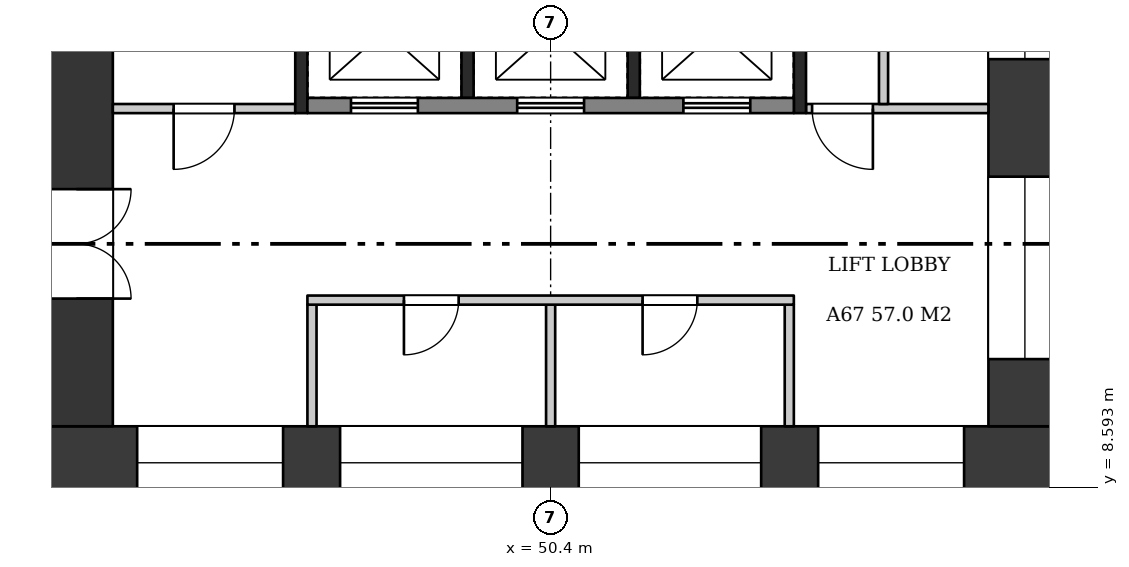
"""IFC4 building model, lengths in metres.
Left out: names, types, materials, properties, quantities, classifications, styles, units other than length and angle.
Written with IfcOpenShell. Run it as: python <this file> out.ifc"""

import sys

from ifc_helpers import new_model, si_unit, direction, frame, frame_2d, origin, place, context, subcontext, project, spatial, rectangle, extrude, element, fill, save


model = new_model("IFC4")
c1 = context("Model", 3, precision=1e-05, world=origin(), true_north=direction((0.0, 1.0)))
c2 = subcontext(c1, "Body", "Model", "MODEL_VIEW")
j1 = project(units=[si_unit("LENGTHUNIT", "METRE"), si_unit("PLANEANGLEUNIT", "RADIAN")], contexts=[c1])
p1 = place(None, origin())
s1 = spatial("IfcSite", under=j1, at=p1, CompositionType="ELEMENT")
p2 = place(p1, origin())
s2 = spatial("IfcBuilding", under=s1, at=p2, CompositionType="ELEMENT")
p3 = place(p2, frame((0.0, 0.0, 256.2)))
s3 = spatial("IfcBuildingStorey", under=s2, at=p3, CompositionType="ELEMENT", Elevation=256.2)
p4 = place(p3, frame((42.0, 9.0, 0.0), z_axis=(0.0, 0.0, 1.0), x_axis=(1.0, 0.0, 0.0)))
e1 = element("IfcWall", 1, at=p4, inside=s3, PredefinedType="SHEAR", context=c2, shape_type="SweptSolid", body=[
    extrude(rectangle(XDim=16.8, YDim=1.2, at=frame_2d((8.4, 0.0))), origin(), (0.0, 0.0, 1.0), 3.22),
])
p5 = place(p4, frame((1.6, 0.0, 0.6)))
e2 = element("IfcOpeningElement", 2, at=p5, cuts=e1, PredefinedType="OPENING", context=c2, shape_type="SweptSolid", body=[
    extrude(rectangle(XDim=2.4, YDim=2.1, at=frame_2d((1.2, 1.05))), frame((0.0, 0.61, 0.0), z_axis=(0.0, -1.0, 0.0), x_axis=(1.0, 0.0, 0.0)), (0.0, 0.0, 1.0), 1.22),
])
p6 = place(p4, frame((4.938, 0.0, 1.6)))
e3 = element("IfcOpeningElement", 3, at=p6, cuts=e1, PredefinedType="OPENING", context=c2, shape_type="SweptSolid", body=[
    extrude(rectangle(XDim=3.0, YDim=1.2, at=frame_2d((1.5, 0.6))), frame((0.0, 0.61, 0.0), z_axis=(0.0, -1.0, 0.0), x_axis=(1.0, 0.0, 0.0)), (0.0, 0.0, 1.0), 1.22),
])
p7 = place(p4, frame((8.863, 0.0, 1.6)))
e4 = element("IfcOpeningElement", 4, at=p7, cuts=e1, PredefinedType="OPENING", context=c2, shape_type="SweptSolid", body=[
    extrude(rectangle(XDim=3.0, YDim=1.2, at=frame_2d((1.5, 0.6))), frame((0.0, 0.61, 0.0), z_axis=(0.0, -1.0, 0.0), x_axis=(1.0, 0.0, 0.0)), (0.0, 0.0, 1.0), 1.22),
])
p8 = place(p4, frame((12.8, 0.0, 0.6)))
e5 = element("IfcOpeningElement", 5, at=p8, cuts=e1, PredefinedType="OPENING", context=c2, shape_type="SweptSolid", body=[
    extrude(rectangle(XDim=2.4, YDim=2.1, at=frame_2d((1.2, 1.05))), frame((0.0, 0.61, 0.0), z_axis=(0.0, -1.0, 0.0), x_axis=(1.0, 0.0, 0.0)), (0.0, 0.0, 1.0), 1.22),
])
p9 = place(p3, frame((42.6, 9.6, 0.0), z_axis=(0.0, 0.0, 1.0), x_axis=(0.0, 1.0, 0.0)))
e6 = element("IfcWall", 6, at=p9, inside=s3, PredefinedType="SHEAR", context=c2, shape_type="SweptSolid", body=[
    extrude(rectangle(XDim=14.4, YDim=1.2, at=frame_2d((7.2, 0.0))), origin(), (0.0, 0.0, 1.0), 3.22),
])
p10 = place(p9, frame((2.1, 0.0, 0.0)))
e7 = element("IfcOpeningElement", 7, at=p10, cuts=e6, PredefinedType="OPENING", context=c2, shape_type="SweptSolid", body=[
    extrude(rectangle(XDim=1.8, YDim=2.1, at=frame_2d((0.9, 1.05))), frame((0.0, 0.61, 0.0), z_axis=(0.0, -1.0, 0.0), x_axis=(1.0, 0.0, 0.0)), (0.0, 0.0, 1.0), 1.22),
])
p11 = place(p3, frame((58.2, 9.6, 0.0), z_axis=(0.0, 0.0, 1.0), x_axis=(0.0, 1.0, 0.0)))
e8 = element("IfcWall", 8, at=p11, inside=s3, PredefinedType="SHEAR", context=c2, shape_type="SweptSolid", body=[
    extrude(rectangle(XDim=14.4, YDim=1.2, at=frame_2d((7.2, 0.0))), origin(), (0.0, 0.0, 1.0), 3.22),
])
p12 = place(p11, frame((1.105, 0.0, 0.6)))
e9 = element("IfcOpeningElement", 9, at=p12, cuts=e8, PredefinedType="OPENING", context=c2, shape_type="SweptSolid", body=[
    extrude(rectangle(XDim=3.0, YDim=2.1, at=frame_2d((1.5, 1.05))), frame((0.0, 0.61, 0.0), z_axis=(0.0, -1.0, 0.0), x_axis=(1.0, 0.0, 0.0)), (0.0, 0.0, 1.0), 1.22),
])
p13 = place(p11, frame((6.038, 0.0, 1.6)))
e10 = element("IfcOpeningElement", 10, at=p13, cuts=e8, PredefinedType="OPENING", context=c2, shape_type="SweptSolid", body=[
    extrude(rectangle(XDim=3.0, YDim=1.2, at=frame_2d((1.5, 0.6))), frame((0.0, 0.61, 0.0), z_axis=(0.0, -1.0, 0.0), x_axis=(1.0, 0.0, 0.0)), (0.0, 0.0, 1.0), 1.22),
])
p14 = place(p11, frame((10.633, 0.0, 1.6)))
e11 = element("IfcOpeningElement", 11, at=p14, cuts=e8, PredefinedType="OPENING", context=c2, shape_type="SweptSolid", body=[
    extrude(rectangle(XDim=3.0, YDim=1.2, at=frame_2d((1.5, 0.6))), frame((0.0, 0.61, 0.0), z_axis=(0.0, -1.0, 0.0), x_axis=(1.0, 0.0, 0.0)), (0.0, 0.0, 1.0), 1.22),
])
for number, where, z_axis, x_axis in (
    (12, (46.475, 9.6, 0.0), (0.0, 0.0, 1.0), (0.0, 1.0, 0.0)),
    (13, (54.325, 9.6, 0.0), (0.0, 0.0, 1.0), (0.0, 1.0, 0.0)),
    (14, (50.4, 9.6, 0.0), (0.0, 0.0, 1.0), (0.0, 1.0, 0.0)),
):
    element("IfcWall", number, at=place(p3, frame(where, z_axis=z_axis, x_axis=x_axis)), inside=s3, PredefinedType="PARTITIONING", context=c2, shape_type="SweptSolid", body=[
        extrude(rectangle(XDim=2.0, YDim=0.15, at=frame_2d((1.0, 0.0))), origin(), (0.0, 0.0, 1.0), 3.22),
    ])
p15 = place(p3, frame((46.4, 11.675, 0.0), z_axis=(0.0, 0.0, 1.0), x_axis=(1.0, 0.0, 0.0)))
e15 = element("IfcWall", 15, at=p15, inside=s3, PredefinedType="PARTITIONING", context=c2, shape_type="SweptSolid", body=[
    extrude(rectangle(XDim=8.0, YDim=0.15, at=frame_2d((4.0, 0.0))), origin(), (0.0, 0.0, 1.0), 3.22),
])
p16 = place(p15, frame((1.587, 0.0, 0.0)))
e16 = element("IfcOpeningElement", 16, at=p16, cuts=e15, PredefinedType="OPENING", context=c2, shape_type="SweptSolid", body=[
    extrude(rectangle(XDim=0.9, YDim=2.1, at=frame_2d((0.45, 1.05))), frame((0.0, 0.085, 0.0), z_axis=(0.0, -1.0, 0.0), x_axis=(1.0, 0.0, 0.0)), (0.0, 0.0, 1.0), 0.17),
])
p17 = place(p15, frame((5.512, 0.0, 0.0)))
e17 = element("IfcOpeningElement", 17, at=p17, cuts=e15, PredefinedType="OPENING", context=c2, shape_type="SweptSolid", body=[
    extrude(rectangle(XDim=0.9, YDim=2.1, at=frame_2d((0.45, 1.05))), frame((0.0, 0.085, 0.0), z_axis=(0.0, -1.0, 0.0), x_axis=(1.0, 0.0, 0.0)), (0.0, 0.0, 1.0), 0.17),
])
for number, where, z_axis, x_axis in (
    (18, (49.033, 15.0, 0.0), (0.0, 0.0, 1.0), (0.0, 1.0, 0.0)),
    (19, (51.767, 15.0, 0.0), (0.0, 0.0, 1.0), (0.0, 1.0, 0.0)),
):
    element("IfcWall", number, at=place(p3, frame(where, z_axis=z_axis, x_axis=x_axis)), inside=s3, PredefinedType="SHEAR", context=c2, shape_type="SweptSolid", body=[
        extrude(rectangle(XDim=1.9, YDim=0.2, at=frame_2d((0.95, 0.0))), origin(), (0.0, 0.0, 1.0), 3.22),
    ])
p18 = place(p3, frame((46.4, 14.875, 0.0), z_axis=(0.0, 0.0, 1.0), x_axis=(1.0, 0.0, 0.0)))
e20 = element("IfcWall", 20, at=p18, inside=s3, PredefinedType="SHEAR", context=c2, shape_type="SweptSolid", body=[
    extrude(rectangle(XDim=8.0, YDim=0.25, at=frame_2d((4.0, 0.0))), origin(), (0.0, 0.0, 1.0), 3.22),
])
p19 = place(p18, frame((0.717, 0.0, 0.0)))
e21 = element("IfcOpeningElement", 21, at=p19, cuts=e20, PredefinedType="OPENING", context=c2, shape_type="SweptSolid", body=[
    extrude(rectangle(XDim=1.1, YDim=2.1, at=frame_2d((0.55, 1.05))), frame((0.0, 0.135, 0.0), z_axis=(0.0, -1.0, 0.0), x_axis=(1.0, 0.0, 0.0)), (0.0, 0.0, 1.0), 0.27),
])
p20 = place(p18, frame((3.45, 0.0, 0.0)))
e22 = element("IfcOpeningElement", 22, at=p20, cuts=e20, PredefinedType="OPENING", context=c2, shape_type="SweptSolid", body=[
    extrude(rectangle(XDim=1.1, YDim=2.1, at=frame_2d((0.55, 1.05))), frame((0.0, 0.135, 0.0), z_axis=(0.0, -1.0, 0.0), x_axis=(1.0, 0.0, 0.0)), (0.0, 0.0, 1.0), 0.27),
])
p21 = place(p18, frame((6.183, 0.0, 0.0)))
e23 = element("IfcOpeningElement", 23, at=p21, cuts=e20, PredefinedType="OPENING", context=c2, shape_type="SweptSolid", body=[
    extrude(rectangle(XDim=1.1, YDim=2.1, at=frame_2d((0.55, 1.05))), frame((0.0, 0.135, 0.0), z_axis=(0.0, -1.0, 0.0), x_axis=(1.0, 0.0, 0.0)), (0.0, 0.0, 1.0), 0.27),
])
p22 = place(p3, frame((46.3, 14.75, 0.0), z_axis=(0.0, 0.0, 1.0), x_axis=(0.0, 1.0, 0.0)))
e24 = element("IfcWall", 24, at=p22, inside=s3, PredefinedType="SHEAR", context=c2, shape_type="SweptSolid", body=[
    extrude(rectangle(XDim=2.4, YDim=0.2, at=frame_2d((1.2, 0.0))), origin(), (0.0, 0.0, 1.0), 3.22),
])
p23 = place(p3, frame((43.2, 14.825, 0.0), z_axis=(0.0, 0.0, 1.0), x_axis=(1.0, 0.0, 0.0)))
e25 = element("IfcWall", 25, at=p23, inside=s3, PredefinedType="PARTITIONING", context=c2, shape_type="SweptSolid", body=[
    extrude(rectangle(XDim=3.0, YDim=0.15, at=frame_2d((1.5, 0.0))), origin(), (0.0, 0.0, 1.0), 3.22),
])
p24 = place(p23, frame((1.0, 0.0, 0.0)))
e26 = element("IfcOpeningElement", 26, at=p24, cuts=e25, PredefinedType="OPENING", context=c2, shape_type="SweptSolid", body=[
    extrude(rectangle(XDim=1.0, YDim=2.1, at=frame_2d((0.5, 1.05))), frame((0.0, 0.085, 0.0), z_axis=(0.0, -1.0, 0.0), x_axis=(1.0, 0.0, 0.0)), (0.0, 0.0, 1.0), 0.17),
])
p25 = place(p3, frame((54.5, 14.75, 0.0), z_axis=(0.0, 0.0, 1.0), x_axis=(0.0, 1.0, 0.0)))
e27 = element("IfcWall", 27, at=p25, inside=s3, PredefinedType="SHEAR", context=c2, shape_type="SweptSolid", body=[
    extrude(rectangle(XDim=9.25, YDim=0.2, at=frame_2d((4.625, 0.0))), origin(), (0.0, 0.0, 1.0), 3.22),
])
p26 = place(p3, frame((54.6, 14.825, 0.0), z_axis=(0.0, 0.0, 1.0), x_axis=(1.0, 0.0, 0.0)))
e28 = element("IfcWall", 28, at=p26, inside=s3, PredefinedType="PARTITIONING", context=c2, shape_type="SweptSolid", body=[
    extrude(rectangle(XDim=3.0, YDim=0.15, at=frame_2d((1.5, 0.0))), origin(), (0.0, 0.0, 1.0), 3.22),
])
p27 = place(p26, frame((0.1, 0.0, 0.0)))
e29 = element("IfcOpeningElement", 29, at=p27, cuts=e28, PredefinedType="OPENING", context=c2, shape_type="SweptSolid", body=[
    extrude(rectangle(XDim=1.0, YDim=2.1, at=frame_2d((0.5, 1.05))), frame((0.0, 0.085, 0.0), z_axis=(0.0, -1.0, 0.0), x_axis=(1.0, 0.0, 0.0)), (0.0, 0.0, 1.0), 0.17),
])
p28 = place(p3, frame((55.875, 14.9, 0.0), z_axis=(0.0, 0.0, 1.0), x_axis=(0.0, 1.0, 0.0)))
e30 = element("IfcWall", 30, at=p28, inside=s3, PredefinedType="PARTITIONING", context=c2, shape_type="SweptSolid", body=[
    extrude(rectangle(XDim=9.1, YDim=0.15, at=frame_2d((4.55, 0.0))), origin(), (0.0, 0.0, 1.0), 3.22),
])
p29 = place(p28, frame((1.788, 0.0, 0.0)))
e31 = element("IfcOpeningElement", 31, at=p29, cuts=e30, PredefinedType="OPENING", context=c2, shape_type="SweptSolid", body=[
    extrude(rectangle(XDim=0.9, YDim=2.1, at=frame_2d((0.45, 1.05))), frame((0.0, 0.085, 0.0), z_axis=(0.0, -1.0, 0.0), x_axis=(1.0, 0.0, 0.0)), (0.0, 0.0, 1.0), 0.17),
])
p30 = place(p28, frame((6.413, 0.0, 0.0)))
e32 = element("IfcOpeningElement", 32, at=p30, cuts=e30, PredefinedType="OPENING", context=c2, shape_type="SweptSolid", body=[
    extrude(rectangle(XDim=0.9, YDim=2.1, at=frame_2d((0.45, 1.05))), frame((0.0, 0.085, 0.0), z_axis=(0.0, -1.0, 0.0), x_axis=(1.0, 0.0, 0.0)), (0.0, 0.0, 1.0), 0.17),
])
p31 = place(p10, frame((1.8, 0.0, 0.0), z_axis=(0.0, 0.0, 1.0), x_axis=(-1.0, 0.0, 0.0)))
e33 = element("IfcDoor", 33, at=p31, inside=s3, OperationType="DOUBLE_DOOR_SINGLE_SWING", PredefinedType="DOOR", context=c2, shape_type="SweptSolid", body=[
    extrude(rectangle(XDim=1.8, YDim=2.1, at=frame_2d((0.9, 1.05))), frame((0.0, 0.025, 0.0), z_axis=(0.0, -1.0, 0.0), x_axis=(1.0, 0.0, 0.0)), (0.0, 0.0, 1.0), 0.05),
])
fill(e7, e33)
p32 = place(p16, frame((0.9, 0.0, 0.0), z_axis=(0.0, 0.0, 1.0), x_axis=(-1.0, 0.0, 0.0)))
e34 = element("IfcDoor", 34, at=p32, inside=s3, OperationType="SINGLE_SWING_RIGHT", PredefinedType="DOOR", context=c2, shape_type="SweptSolid", body=[
    extrude(rectangle(XDim=0.9, YDim=2.1, at=frame_2d((0.45, 1.05))), frame((0.0, 0.025, 0.0), z_axis=(0.0, -1.0, 0.0), x_axis=(1.0, 0.0, 0.0)), (0.0, 0.0, 1.0), 0.05),
])
fill(e16, e34)
p33 = place(p17, frame((0.9, 0.0, 0.0), z_axis=(0.0, 0.0, 1.0), x_axis=(-1.0, 0.0, 0.0)))
e35 = element("IfcDoor", 35, at=p33, inside=s3, OperationType="SINGLE_SWING_RIGHT", PredefinedType="DOOR", context=c2, shape_type="SweptSolid", body=[
    extrude(rectangle(XDim=0.9, YDim=2.1, at=frame_2d((0.45, 1.05))), frame((0.0, 0.025, 0.0), z_axis=(0.0, -1.0, 0.0), x_axis=(1.0, 0.0, 0.0)), (0.0, 0.0, 1.0), 0.05),
])
fill(e17, e35)
p34 = place(p19, origin())
e36 = element("IfcDoor", 36, at=p34, inside=s3, OperationType="DOUBLE_DOOR_SLIDING", PredefinedType="DOOR", context=c2, shape_type="SweptSolid", body=[
    extrude(rectangle(XDim=1.1, YDim=2.1, at=frame_2d((0.55, 1.05))), frame((0.0, 0.025, 0.0), z_axis=(0.0, -1.0, 0.0), x_axis=(1.0, 0.0, 0.0)), (0.0, 0.0, 1.0), 0.05),
])
fill(e21, e36)
p35 = place(p20, origin())
e37 = element("IfcDoor", 37, at=p35, inside=s3, OperationType="DOUBLE_DOOR_SLIDING", PredefinedType="DOOR", context=c2, shape_type="SweptSolid", body=[
    extrude(rectangle(XDim=1.1, YDim=2.1, at=frame_2d((0.55, 1.05))), frame((0.0, 0.025, 0.0), z_axis=(0.0, -1.0, 0.0), x_axis=(1.0, 0.0, 0.0)), (0.0, 0.0, 1.0), 0.05),
])
fill(e22, e37)
p36 = place(p21, origin())
e38 = element("IfcDoor", 38, at=p36, inside=s3, OperationType="DOUBLE_DOOR_SLIDING", PredefinedType="DOOR", context=c2, shape_type="SweptSolid", body=[
    extrude(rectangle(XDim=1.1, YDim=2.1, at=frame_2d((0.55, 1.05))), frame((0.0, 0.025, 0.0), z_axis=(0.0, -1.0, 0.0), x_axis=(1.0, 0.0, 0.0)), (0.0, 0.0, 1.0), 0.05),
])
fill(e23, e38)
p37 = place(p24, frame((1.0, 0.0, 0.0), z_axis=(0.0, 0.0, 1.0), x_axis=(-1.0, 0.0, 0.0)))
e39 = element("IfcDoor", 39, at=p37, inside=s3, OperationType="SINGLE_SWING_RIGHT", PredefinedType="DOOR", context=c2, shape_type="SweptSolid", body=[
    extrude(rectangle(XDim=1.0, YDim=2.1, at=frame_2d((0.5, 1.05))), frame((0.0, 0.025, 0.0), z_axis=(0.0, -1.0, 0.0), x_axis=(1.0, 0.0, 0.0)), (0.0, 0.0, 1.0), 0.05),
])
fill(e26, e39)
p38 = place(p27, frame((1.0, 0.0, 0.0), z_axis=(0.0, 0.0, 1.0), x_axis=(-1.0, 0.0, 0.0)))
e40 = element("IfcDoor", 40, at=p38, inside=s3, OperationType="SINGLE_SWING_LEFT", PredefinedType="DOOR", context=c2, shape_type="SweptSolid", body=[
    extrude(rectangle(XDim=1.0, YDim=2.1, at=frame_2d((0.5, 1.05))), frame((0.0, 0.025, 0.0), z_axis=(0.0, -1.0, 0.0), x_axis=(1.0, 0.0, 0.0)), (0.0, 0.0, 1.0), 0.05),
])
fill(e29, e40)
p39 = place(p5, origin())
e41 = element("IfcWindow", 41, at=p39, inside=s3, PartitioningType="SINGLE_PANEL", PredefinedType="WINDOW", context=c2, shape_type="SweptSolid", body=[
    extrude(rectangle(XDim=2.4, YDim=2.1, at=frame_2d((1.2, 1.05))), frame((0.0, 0.03, 0.0), z_axis=(0.0, -1.0, 0.0), x_axis=(1.0, 0.0, 0.0)), (0.0, 0.0, 1.0), 0.06),
])
fill(e2, e41)
p40 = place(p6, origin())
e42 = element("IfcWindow", 42, at=p40, inside=s3, PartitioningType="SINGLE_PANEL", PredefinedType="WINDOW", context=c2, shape_type="SweptSolid", body=[
    extrude(rectangle(XDim=3.0, YDim=1.2, at=frame_2d((1.5, 0.6))), frame((0.0, 0.03, 0.0), z_axis=(0.0, -1.0, 0.0), x_axis=(1.0, 0.0, 0.0)), (0.0, 0.0, 1.0), 0.06),
])
fill(e3, e42)
p41 = place(p7, origin())
e43 = element("IfcWindow", 43, at=p41, inside=s3, PartitioningType="SINGLE_PANEL", PredefinedType="WINDOW", context=c2, shape_type="SweptSolid", body=[
    extrude(rectangle(XDim=3.0, YDim=1.2, at=frame_2d((1.5, 0.6))), frame((0.0, 0.03, 0.0), z_axis=(0.0, -1.0, 0.0), x_axis=(1.0, 0.0, 0.0)), (0.0, 0.0, 1.0), 0.06),
])
fill(e4, e43)
p42 = place(p8, origin())
e44 = element("IfcWindow", 44, at=p42, inside=s3, PartitioningType="SINGLE_PANEL", PredefinedType="WINDOW", context=c2, shape_type="SweptSolid", body=[
    extrude(rectangle(XDim=2.4, YDim=2.1, at=frame_2d((1.2, 1.05))), frame((0.0, 0.03, 0.0), z_axis=(0.0, -1.0, 0.0), x_axis=(1.0, 0.0, 0.0)), (0.0, 0.0, 1.0), 0.06),
])
fill(e5, e44)
p43 = place(p12, origin())
e45 = element("IfcWindow", 45, at=p43, inside=s3, PartitioningType="SINGLE_PANEL", PredefinedType="WINDOW", context=c2, shape_type="SweptSolid", body=[
    extrude(rectangle(XDim=3.0, YDim=2.1, at=frame_2d((1.5, 1.05))), frame((0.0, 0.03, 0.0), z_axis=(0.0, -1.0, 0.0), x_axis=(1.0, 0.0, 0.0)), (0.0, 0.0, 1.0), 0.06),
])
fill(e9, e45)
p44 = place(p13, origin())
e46 = element("IfcWindow", 46, at=p44, inside=s3, PartitioningType="SINGLE_PANEL", PredefinedType="WINDOW", context=c2, shape_type="SweptSolid", body=[
    extrude(rectangle(XDim=3.0, YDim=1.2, at=frame_2d((1.5, 0.6))), frame((0.0, 0.03, 0.0), z_axis=(0.0, -1.0, 0.0), x_axis=(1.0, 0.0, 0.0)), (0.0, 0.0, 1.0), 0.06),
])
fill(e10, e46)
save(model, sys.argv[1])
